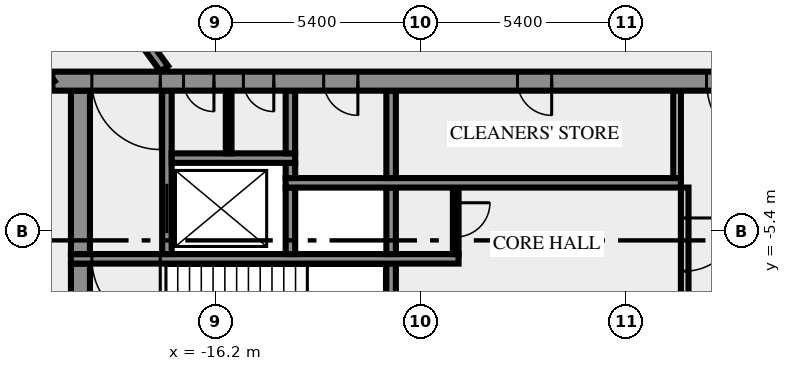
"""IFC4 building model, lengths in metres.
Left out: names, types, materials, properties, quantities, classifications, styles, units other than length and angle.
Written with IfcOpenShell. Run it as: python <this file> out.ifc"""

import sys

from ifc_helpers import new_model, si_unit, direction, frame, frame_2d, origin, place, context, subcontext, project, spatial, rectangle, extrude, element, fill, save


model = new_model("IFC4")
c1 = context("Model", 3, precision=1e-05, world=origin(), true_north=direction((0.0, 1.0)))
c2 = subcontext(c1, "Body", "Model", "MODEL_VIEW")
j1 = project(units=[si_unit("LENGTHUNIT", "METRE"), si_unit("PLANEANGLEUNIT", "RADIAN")], contexts=[c1])
p1 = place(None, origin())
s1 = spatial("IfcSite", under=j1, at=p1, CompositionType="ELEMENT")
p2 = place(p1, origin())
s2 = spatial("IfcBuilding", under=s1, at=p2, CompositionType="ELEMENT")
p3 = place(p2, frame((0.0, 0.0, 176.0)))
s3 = spatial("IfcBuildingStorey", under=s2, at=p3, CompositionType="ELEMENT", Elevation=176.0)
p4 = place(p3, frame((-19.75, -10.5, 0.0), z_axis=(0.0, 0.0, 1.0), x_axis=(0.0, 1.0, 0.0)))
e1 = element("IfcWall", 1, at=p4, inside=s3, PredefinedType="SHEAR", context=c2, shape_type="SweptSolid", body=[
    extrude(rectangle(XDim=4.25, YDim=0.5, at=frame_2d((2.125, 0.0))), origin(), (0.0, 0.0, 1.0), 3.65),
])
p5 = place(p3, frame((-11.575, -7.25, 0.0), z_axis=(0.0, 0.0, 1.0), x_axis=(0.0, 1.0, 0.0)))
e2 = element("IfcWall", 2, at=p5, inside=s3, PredefinedType="SHEAR", context=c2, shape_type="SweptSolid", body=[
    extrude(rectangle(XDim=1.0, YDim=0.25, at=frame_2d((0.5, 0.0))), origin(), (0.0, 0.0, 1.0), 3.65),
])
p6 = place(p3, frame((-3.85, -4.25, 0.0), z_axis=(0.0, 0.0, 1.0), x_axis=(0.0, -1.0, 0.0)))
e3 = element("IfcWall", 3, at=p6, inside=s3, PredefinedType="SOLIDWALL", context=c2, shape_type="SweptSolid", body=[
    extrude(rectangle(XDim=3.0, YDim=0.2, at=frame_2d((1.5, 0.0))), origin(), (0.0, 0.0, 1.0), 3.65),
])
p7 = place(p6, frame((0.8, 0.0, 0.0)))
e4 = element("IfcOpeningElement", 4, at=p7, cuts=e3, PredefinedType="OPENING", context=c2, shape_type="SweptSolid", body=[
    extrude(rectangle(XDim=1.4, YDim=2.1, at=frame_2d((0.7, 1.05))), frame((0.0, 0.11, 0.0), z_axis=(0.0, -1.0, 0.0), x_axis=(1.0, 0.0, 0.0)), (0.0, 0.0, 1.0), 0.22),
])
p8 = place(p3, frame((-9.8, -6.125, 0.0), z_axis=(0.0, 0.0, 1.0), x_axis=(-1.0, 0.0, 0.0)))
e5 = element("IfcWall", 5, at=p8, inside=s3, PredefinedType="SHEAR", context=c2, shape_type="SweptSolid", body=[
    extrude(rectangle(XDim=10.2, YDim=0.25, at=frame_2d((5.1, 0.0))), origin(), (0.0, 0.0, 1.0), 3.65),
])
p9 = place(p8, frame((7.85, 0.0, 0.0)))
e6 = element("IfcOpeningElement", 6, at=p9, cuts=e5, PredefinedType="OPENING", context=c2, shape_type="SweptSolid", body=[
    extrude(rectangle(XDim=1.8, YDim=2.1, at=frame_2d((0.9, 1.05))), frame((0.0, 0.135, 0.0), z_axis=(0.0, -1.0, 0.0), x_axis=(1.0, 0.0, 0.0)), (0.0, 0.0, 1.0), 0.27),
])
p10 = place(p3, frame((-19.75, -6.0, 0.0), z_axis=(0.0, 0.0, 1.0), x_axis=(0.0, 1.0, 0.0)))
e7 = element("IfcWall", 7, at=p10, inside=s3, PredefinedType="SHEAR", context=c2, shape_type="SweptSolid", body=[
    extrude(rectangle(XDim=4.3, YDim=0.5, at=frame_2d((2.15, 0.0))), origin(), (0.0, 0.0, 1.0), 3.65),
])
p11 = place(p3, frame((-17.475, -6.0, 0.0), z_axis=(0.0, 0.0, 1.0), x_axis=(0.0, 1.0, 0.0)))
e8 = element("IfcWall", 8, at=p11, inside=s3, PredefinedType="SHEAR", context=c2, shape_type="SweptSolid", body=[
    extrude(rectangle(XDim=4.3, YDim=0.25, at=frame_2d((2.15, 0.0))), origin(), (0.0, 0.0, 1.0), 3.65),
])
p12 = place(p11, frame((0.55, 0.0, 0.0)))
e9 = element("IfcOpeningElement", 9, at=p12, cuts=e8, PredefinedType="OPENING", context=c2, shape_type="SweptSolid", body=[
    extrude(rectangle(XDim=1.3, YDim=2.1, at=frame_2d((0.65, 1.05))), frame((0.0, 0.135, 0.0), z_axis=(0.0, -1.0, 0.0), x_axis=(1.0, 0.0, 0.0)), (0.0, 0.0, 1.0), 0.27),
])
for number, where, z_axis, x_axis in (
    (10, (-14.225, -6.0, 0.0), (0.0, 0.0, 1.0), (0.0, 1.0, 0.0)),
    (11, (-11.575, -6.0, 0.0), (0.0, 0.0, 1.0), (0.0, 1.0, 0.0)),
):
    element("IfcWall", number, at=place(p3, frame(where, z_axis=z_axis, x_axis=x_axis)), inside=s3, PredefinedType="SHEAR", context=c2, shape_type="SweptSolid", body=[
        extrude(rectangle(XDim=1.75, YDim=0.25, at=frame_2d((0.875, 0.0))), origin(), (0.0, 0.0, 1.0), 3.65),
    ])
p13 = place(p3, frame((-9.875, -4.25, 0.0), z_axis=(0.0, 0.0, 1.0), x_axis=(0.0, -1.0, 0.0)))
e12 = element("IfcWall", 12, at=p13, inside=s3, PredefinedType="PARTITIONING", context=c2, shape_type="SweptSolid", body=[
    extrude(rectangle(XDim=1.75, YDim=0.15, at=frame_2d((0.875, 0.0))), origin(), (0.0, 0.0, 1.0), 3.65),
])
p14 = place(p13, frame((0.4, 0.0, 0.0)))
e13 = element("IfcOpeningElement", 13, at=p14, cuts=e12, PredefinedType="OPENING", context=c2, shape_type="SweptSolid", body=[
    extrude(rectangle(XDim=0.9, YDim=2.1, at=frame_2d((0.45, 1.05))), frame((0.0, 0.085, 0.0), z_axis=(0.0, -1.0, 0.0), x_axis=(1.0, 0.0, 0.0)), (0.0, 0.0, 1.0), 0.17),
])
p15 = place(p3, frame((-14.35, -4.125, 0.0), z_axis=(0.0, 0.0, 1.0), x_axis=(1.0, 0.0, 0.0)))
e14 = element("IfcWall", 14, at=p15, inside=s3, PredefinedType="SHEAR", context=c2, shape_type="SweptSolid", body=[
    extrude(rectangle(XDim=10.4, YDim=0.25, at=frame_2d((5.2, 0.0))), origin(), (0.0, 0.0, 1.0), 3.65),
])
p16 = place(p3, frame((-14.225, -4.0, 0.0), z_axis=(0.0, 0.0, 1.0), x_axis=(0.0, 1.0, 0.0)))
e15 = element("IfcWall", 15, at=p16, inside=s3, PredefinedType="SHEAR", context=c2, shape_type="SweptSolid", body=[
    extrude(rectangle(XDim=0.4, YDim=0.25, at=frame_2d((0.2, 0.0))), origin(), (0.0, 0.0, 1.0), 3.65),
])
p17 = place(p3, frame((-11.575, -4.0, 0.0), z_axis=(0.0, 0.0, 1.0), x_axis=(0.0, 1.0, 0.0)))
e16 = element("IfcWall", 16, at=p17, inside=s3, PredefinedType="SHEAR", context=c2, shape_type="SweptSolid", body=[
    extrude(rectangle(XDim=2.3, YDim=0.25, at=frame_2d((1.15, 0.0))), origin(), (0.0, 0.0, 1.0), 3.65),
])
p18 = place(p3, frame((-4.05, -4.0, 0.0), z_axis=(0.0, 0.0, 1.0), x_axis=(0.0, 1.0, 0.0)))
e17 = element("IfcWall", 17, at=p18, inside=s3, PredefinedType="SOLIDWALL", context=c2, shape_type="SweptSolid", body=[
    extrude(rectangle(XDim=2.3, YDim=0.2, at=frame_2d((1.15, 0.0))), origin(), (0.0, 0.0, 1.0), 3.65),
])
p19 = place(p3, frame((-17.35, -3.475, 0.0), z_axis=(0.0, 0.0, 1.0), x_axis=(1.0, 0.0, 0.0)))
e18 = element("IfcWall", 18, at=p19, inside=s3, PredefinedType="SHEAR", context=c2, shape_type="SweptSolid", body=[
    extrude(rectangle(XDim=3.25, YDim=0.25, at=frame_2d((1.625, 0.0))), origin(), (0.0, 0.0, 1.0), 3.65),
])
p20 = place(p3, frame((-15.85, -3.35, 0.0), z_axis=(0.0, 0.0, 1.0), x_axis=(0.0, 1.0, 0.0)))
e19 = element("IfcWall", 19, at=p20, inside=s3, PredefinedType="PARTITIONING", context=c2, shape_type="SweptSolid", body=[
    extrude(rectangle(XDim=1.65, YDim=0.15, at=frame_2d((0.825, 0.0))), origin(), (0.0, 0.0, 1.0), 3.65),
])
p21 = place(p3, frame((-14.225, -3.35, 0.0), z_axis=(0.0, 0.0, 1.0), x_axis=(0.0, 1.0, 0.0)))
e20 = element("IfcWall", 20, at=p21, inside=s3, PredefinedType="SHEAR", context=c2, shape_type="SweptSolid", body=[
    extrude(rectangle(XDim=1.65, YDim=0.25, at=frame_2d((0.825, 0.0))), origin(), (0.0, 0.0, 1.0), 3.65),
])
p22 = place(p3, frame((20.49, -1.45, 0.0), z_axis=(0.0, 0.0, 1.0), x_axis=(-1.0, 0.0, 0.0)))
e21 = element("IfcWall", 21, at=p22, inside=s3, PredefinedType="SHEAR", context=c2, shape_type="SweptSolid", body=[
    extrude(rectangle(XDim=40.98, YDim=0.5, at=frame_2d((20.49, 0.0))), origin(), (0.0, 0.0, 1.0), 3.65),
])
p23 = place(p22, frame((38.14, 0.0, 0.0)))
e22 = element("IfcOpeningElement", 22, at=p23, cuts=e21, PredefinedType="OPENING", context=c2, shape_type="SweptSolid", body=[
    extrude(rectangle(XDim=1.8, YDim=2.1, at=frame_2d((0.9, 1.05))), frame((0.0, 0.26, 0.0), z_axis=(0.0, -1.0, 0.0), x_axis=(1.0, 0.0, 0.0)), (0.0, 0.0, 1.0), 0.52),
])
p24 = place(p22, frame((36.728, 0.0, 0.0)))
e23 = element("IfcOpeningElement", 23, at=p24, cuts=e21, PredefinedType="OPENING", context=c2, shape_type="SweptSolid", body=[
    extrude(rectangle(XDim=0.8, YDim=2.1, at=frame_2d((0.4, 1.05))), frame((0.0, 0.26, 0.0), z_axis=(0.0, -1.0, 0.0), x_axis=(1.0, 0.0, 0.0)), (0.0, 0.0, 1.0), 0.52),
])
p25 = place(p22, frame((35.153, 0.0, 0.0)))
e24 = element("IfcOpeningElement", 24, at=p25, cuts=e21, PredefinedType="OPENING", context=c2, shape_type="SweptSolid", body=[
    extrude(rectangle(XDim=0.8, YDim=2.1, at=frame_2d((0.4, 1.05))), frame((0.0, 0.26, 0.0), z_axis=(0.0, -1.0, 0.0), x_axis=(1.0, 0.0, 0.0)), (0.0, 0.0, 1.0), 0.52),
])
p26 = place(p22, frame((32.94, 0.0, 0.0)))
e25 = element("IfcOpeningElement", 25, at=p26, cuts=e21, PredefinedType="OPENING", context=c2, shape_type="SweptSolid", body=[
    extrude(rectangle(XDim=0.9, YDim=2.1, at=frame_2d((0.45, 1.05))), frame((0.0, 0.26, 0.0), z_axis=(0.0, -1.0, 0.0), x_axis=(1.0, 0.0, 0.0)), (0.0, 0.0, 1.0), 0.52),
])
p27 = place(p22, frame((27.84, 0.0, 0.0)))
e26 = element("IfcOpeningElement", 26, at=p27, cuts=e21, PredefinedType="OPENING", context=c2, shape_type="SweptSolid", body=[
    extrude(rectangle(XDim=0.9, YDim=2.1, at=frame_2d((0.45, 1.05))), frame((0.0, 0.26, 0.0), z_axis=(0.0, -1.0, 0.0), x_axis=(1.0, 0.0, 0.0)), (0.0, 0.0, 1.0), 0.52),
])
p28 = place(p22, frame((21.765, 0.0, 0.0)))
e27 = element("IfcOpeningElement", 27, at=p28, cuts=e21, PredefinedType="OPENING", context=c2, shape_type="SweptSolid", body=[
    extrude(rectangle(XDim=2.0, YDim=2.1, at=frame_2d((1.0, 1.05))), frame((0.0, 0.26, 0.0), z_axis=(0.0, -1.0, 0.0), x_axis=(1.0, 0.0, 0.0)), (0.0, 0.0, 1.0), 0.52),
])
p29 = place(p22, frame((7.14, 0.0, 0.0)))
e28 = element("IfcOpeningElement", 28, at=p29, cuts=e21, PredefinedType="OPENING", context=c2, shape_type="SweptSolid", body=[
    extrude(rectangle(XDim=0.9, YDim=2.1, at=frame_2d((0.45, 1.05))), frame((0.0, 0.26, 0.0), z_axis=(0.0, -1.0, 0.0), x_axis=(1.0, 0.0, 0.0)), (0.0, 0.0, 1.0), 0.52),
])
p30 = place(p22, frame((4.19, 0.0, 0.0)))
e29 = element("IfcOpeningElement", 29, at=p30, cuts=e21, PredefinedType="OPENING", context=c2, shape_type="SweptSolid", body=[
    extrude(rectangle(XDim=0.9, YDim=2.1, at=frame_2d((0.45, 1.05))), frame((0.0, 0.26, 0.0), z_axis=(0.0, -1.0, 0.0), x_axis=(1.0, 0.0, 0.0)), (0.0, 0.0, 1.0), 0.52),
])
p31 = place(p22, frame((1.04, 0.0, 0.0)))
e30 = element("IfcOpeningElement", 30, at=p31, cuts=e21, PredefinedType="OPENING", context=c2, shape_type="SweptSolid", body=[
    extrude(rectangle(XDim=1.8, YDim=2.1, at=frame_2d((0.9, 1.05))), frame((0.0, 0.26, 0.0), z_axis=(0.0, -1.0, 0.0), x_axis=(1.0, 0.0, 0.0)), (0.0, 0.0, 1.0), 0.52),
])
p32 = place(p3, frame((-20.531, -1.523, 0.0), z_axis=(0.0, 0.0, 1.0), x_axis=(-0.587784239999, 0.809017729849, 0.0)))
e31 = element("IfcWall", 31, at=p32, inside=s3, PredefinedType="SOLIDWALL", context=c2, shape_type="SweptSolid", body=[
    extrude(rectangle(XDim=23.271, YDim=0.25, at=frame_2d((11.635, 0.0))), origin(), (0.0, 0.0, 1.0), 3.65),
])
p33 = place(p32, frame((18.366, 0.0, 0.0)))
e32 = element("IfcOpeningElement", 32, at=p33, cuts=e31, PredefinedType="OPENING", context=c2, shape_type="SweptSolid", body=[
    extrude(rectangle(XDim=0.9, YDim=2.1, at=frame_2d((0.45, 1.05))), frame((0.0, 0.135, 0.0), z_axis=(0.0, -1.0, 0.0), x_axis=(1.0, 0.0, 0.0)), (0.0, 0.0, 1.0), 0.27),
])
p34 = place(p32, frame((10.266, 0.0, 0.0)))
e33 = element("IfcOpeningElement", 33, at=p34, cuts=e31, PredefinedType="OPENING", context=c2, shape_type="SweptSolid", body=[
    extrude(rectangle(XDim=0.9, YDim=2.1, at=frame_2d((0.45, 1.05))), frame((0.0, 0.135, 0.0), z_axis=(0.0, -1.0, 0.0), x_axis=(1.0, 0.0, 0.0)), (0.0, 0.0, 1.0), 0.27),
])
p35 = place(p32, frame((21.896, 0.0, 0.0)))
e34 = element("IfcOpeningElement", 34, at=p35, cuts=e31, PredefinedType="OPENING", context=c2, shape_type="SweptSolid", body=[
    extrude(rectangle(XDim=0.9, YDim=2.1, at=frame_2d((0.45, 1.05))), frame((0.0, 0.135, 0.0), z_axis=(0.0, -1.0, 0.0), x_axis=(1.0, 0.0, 0.0)), (0.0, 0.0, 1.0), 0.27),
])
p36 = place(p32, frame((12.966, 0.0, 0.0)))
e35 = element("IfcOpeningElement", 35, at=p36, cuts=e31, PredefinedType="OPENING", context=c2, shape_type="SweptSolid", body=[
    extrude(rectangle(XDim=0.9, YDim=2.1, at=frame_2d((0.45, 1.05))), frame((0.0, 0.135, 0.0), z_axis=(0.0, -1.0, 0.0), x_axis=(1.0, 0.0, 0.0)), (0.0, 0.0, 1.0), 0.27),
])
p37 = place(p3, frame((-31.918, 18.658, 0.0), z_axis=(0.0, 0.0, 1.0), x_axis=(0.587788731405, -0.80901446664, 0.0)))
e36 = element("IfcWall", 36, at=p37, inside=s3, PredefinedType="SOLIDWALL", context=c2, shape_type="SweptSolid", body=[
    extrude(rectangle(XDim=24.453, YDim=0.25, at=frame_2d((12.227, 0.0))), origin(), (0.0, 0.0, 1.0), 3.65),
])
p38 = place(p37, frame((0.224, 0.0, 0.0)))
e37 = element("IfcOpeningElement", 37, at=p38, cuts=e36, PredefinedType="OPENING", context=c2, shape_type="SweptSolid", body=[
    extrude(rectangle(XDim=0.9, YDim=2.1, at=frame_2d((0.45, 1.05))), frame((0.0, 0.135, 0.0), z_axis=(0.0, -1.0, 0.0), x_axis=(1.0, 0.0, 0.0)), (0.0, 0.0, 1.0), 0.27),
])
p39 = place(p7, origin())
e38 = element("IfcDoor", 38, at=p39, inside=s3, OperationType="DOUBLE_DOOR_SINGLE_SWING", PredefinedType="DOOR", context=c2, shape_type="SweptSolid", body=[
    extrude(rectangle(XDim=1.4, YDim=2.1, at=frame_2d((0.7, 1.05))), frame((0.0, 0.025, 0.0), z_axis=(0.0, -1.0, 0.0), x_axis=(1.0, 0.0, 0.0)), (0.0, 0.0, 1.0), 0.05),
])
fill(e4, e38)
p40 = place(p9, origin())
e39 = element("IfcDoor", 39, at=p40, inside=s3, OperationType="DOUBLE_DOOR_SINGLE_SWING", PredefinedType="DOOR", context=c2, shape_type="SweptSolid", body=[
    extrude(rectangle(XDim=1.8, YDim=2.1, at=frame_2d((0.9, 1.05))), frame((0.0, 0.025, 0.0), z_axis=(0.0, -1.0, 0.0), x_axis=(1.0, 0.0, 0.0)), (0.0, 0.0, 1.0), 0.05),
])
fill(e6, e39)
p41 = place(p12, origin())
e40 = element("IfcDoor", 40, at=p41, inside=s3, OperationType="DOUBLE_DOOR_SLIDING", PredefinedType="DOOR", context=c2, shape_type="SweptSolid", body=[
    extrude(rectangle(XDim=1.3, YDim=2.1, at=frame_2d((0.65, 1.05))), frame((0.0, 0.025, 0.0), z_axis=(0.0, -1.0, 0.0), x_axis=(1.0, 0.0, 0.0)), (0.0, 0.0, 1.0), 0.05),
])
fill(e9, e40)
p42 = place(p14, origin())
e41 = element("IfcDoor", 41, at=p42, inside=s3, OperationType="SINGLE_SWING_LEFT", PredefinedType="DOOR", context=c2, shape_type="SweptSolid", body=[
    extrude(rectangle(XDim=0.9, YDim=2.1, at=frame_2d((0.45, 1.05))), frame((0.0, 0.025, 0.0), z_axis=(0.0, -1.0, 0.0), x_axis=(1.0, 0.0, 0.0)), (0.0, 0.0, 1.0), 0.05),
])
fill(e13, e41)
p43 = place(p23, origin())
e42 = element("IfcDoor", 42, at=p43, inside=s3, OperationType="DOUBLE_DOOR_SINGLE_SWING", PredefinedType="DOOR", context=c2, shape_type="SweptSolid", body=[
    extrude(rectangle(XDim=1.8, YDim=2.1, at=frame_2d((0.9, 1.05))), frame((0.0, 0.025, 0.0), z_axis=(0.0, -1.0, 0.0), x_axis=(1.0, 0.0, 0.0)), (0.0, 0.0, 1.0), 0.05),
])
fill(e22, e42)
p44 = place(p24, origin())
e43 = element("IfcDoor", 43, at=p44, inside=s3, OperationType="SINGLE_SWING_RIGHT", PredefinedType="DOOR", context=c2, shape_type="SweptSolid", body=[
    extrude(rectangle(XDim=0.8, YDim=2.1, at=frame_2d((0.4, 1.05))), frame((0.0, 0.025, 0.0), z_axis=(0.0, -1.0, 0.0), x_axis=(1.0, 0.0, 0.0)), (0.0, 0.0, 1.0), 0.05),
])
fill(e23, e43)
p45 = place(p25, origin())
e44 = element("IfcDoor", 44, at=p45, inside=s3, OperationType="SINGLE_SWING_RIGHT", PredefinedType="DOOR", context=c2, shape_type="SweptSolid", body=[
    extrude(rectangle(XDim=0.8, YDim=2.1, at=frame_2d((0.4, 1.05))), frame((0.0, 0.025, 0.0), z_axis=(0.0, -1.0, 0.0), x_axis=(1.0, 0.0, 0.0)), (0.0, 0.0, 1.0), 0.05),
])
fill(e24, e44)
p46 = place(p26, origin())
e45 = element("IfcDoor", 45, at=p46, inside=s3, OperationType="SINGLE_SWING_RIGHT", PredefinedType="DOOR", context=c2, shape_type="SweptSolid", body=[
    extrude(rectangle(XDim=0.9, YDim=2.1, at=frame_2d((0.45, 1.05))), frame((0.0, 0.025, 0.0), z_axis=(0.0, -1.0, 0.0), x_axis=(1.0, 0.0, 0.0)), (0.0, 0.0, 1.0), 0.05),
])
fill(e25, e45)
p47 = place(p27, origin())
e46 = element("IfcDoor", 46, at=p47, inside=s3, OperationType="SINGLE_SWING_RIGHT", PredefinedType="DOOR", context=c2, shape_type="SweptSolid", body=[
    extrude(rectangle(XDim=0.9, YDim=2.1, at=frame_2d((0.45, 1.05))), frame((0.0, 0.025, 0.0), z_axis=(0.0, -1.0, 0.0), x_axis=(1.0, 0.0, 0.0)), (0.0, 0.0, 1.0), 0.05),
])
fill(e26, e46)
p48 = place(p28, origin())
e47 = element("IfcDoor", 47, at=p48, inside=s3, OperationType="DOUBLE_DOOR_SINGLE_SWING", PredefinedType="DOOR", context=c2, shape_type="SweptSolid", body=[
    extrude(rectangle(XDim=2.0, YDim=2.1, at=frame_2d((1.0, 1.05))), frame((0.0, 0.025, 0.0), z_axis=(0.0, -1.0, 0.0), x_axis=(1.0, 0.0, 0.0)), (0.0, 0.0, 1.0), 0.05),
])
fill(e27, e47)
save(model, sys.argv[1])
